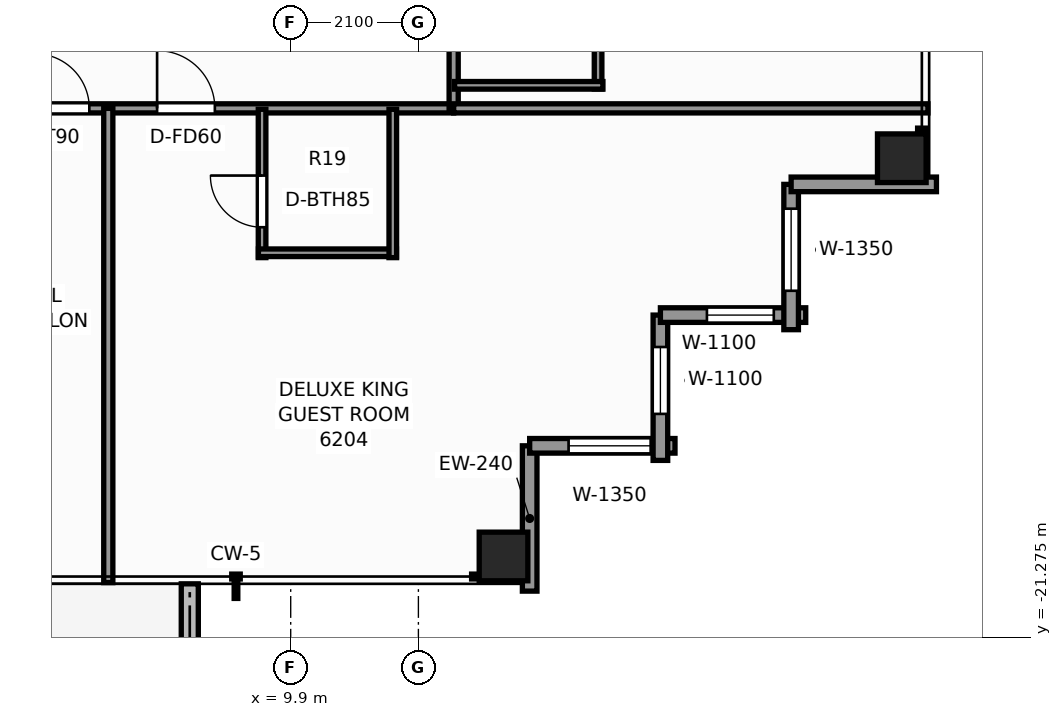
"""IFC4 building model, lengths in metres.
Left out: names, types, materials, properties, quantities, classifications, styles, units other than length and angle.
Written with IfcOpenShell. Run it as: python <this file> out.ifc"""

import sys

from ifc_helpers import new_model, si_unit, direction, frame, frame_2d, origin, origin_2d, place, context, subcontext, project, spatial, rectangle, extrude, element, fill, save


model = new_model("IFC4")
c1 = context("Model", 3, precision=1e-05, world=origin(), true_north=direction((0.0, 1.0)))
c2 = subcontext(c1, "Body", "Model", "MODEL_VIEW")
j1 = project(units=[si_unit("LENGTHUNIT", "METRE"), si_unit("PLANEANGLEUNIT", "RADIAN")], contexts=[c1])
p1 = place(None, origin())
s1 = spatial("IfcSite", under=j1, at=p1, CompositionType="ELEMENT")
p2 = place(p1, origin())
s2 = spatial("IfcBuilding", under=s1, at=p2, CompositionType="ELEMENT")
p3 = place(p2, frame((0.0, 0.0, 213.0)))
s3 = spatial("IfcBuildingStorey", under=s2, at=p3, CompositionType="ELEMENT", Elevation=213.0)
for number, where, z_axis, x_axis in (
    (1, (13.4, -19.95, 0.0), (0.0, 0.0, 1.0), (1.0, 0.0, 0.0)),
    (2, (19.95, -13.4, 0.0), (0.0, 0.0, 1.0), (1.0, 0.0, 0.0)),
):
    element("IfcColumn", number, at=place(p3, frame(where, z_axis=z_axis, x_axis=x_axis)), inside=s3, PredefinedType="COLUMN", context=c2, shape_type="SweptSolid", body=[
        extrude(rectangle(XDim=0.8, YDim=0.8, at=origin_2d()), origin(), (0.0, 0.0, 1.0), 3.3),
    ])
p4 = place(p3, frame((8.24, -23.074, -0.04), z_axis=(0.0, 0.0, 1.0), x_axis=(0.0, 1.0, 0.0)))
e3 = element("IfcWall", 3, at=p4, inside=s3, PredefinedType="PARAPET", context=c2, shape_type="SweptSolid", body=[
    extrude(rectangle(XDim=2.674, YDim=0.28, at=frame_2d((1.337, 0.0))), origin(), (0.0, 0.0, 1.0), 0.42),
])
p5 = place(p3, frame((13.83, -18.13, 0.0), z_axis=(0.0, 0.0, 1.0), x_axis=(0.0, -1.0, 0.0)))
e4 = element("IfcWall", 4, at=p5, inside=s3, PredefinedType="STANDARD", context=c2, shape_type="SweptSolid", body=[
    extrude(rectangle(XDim=2.39, YDim=0.24, at=frame_2d((1.195, 0.0))), origin(), (0.0, 0.0, 1.0), 2.463),
])
p6 = place(p3, frame((16.22, -18.13, 0.0), z_axis=(0.0, 0.0, 1.0), x_axis=(-1.0, 0.0, 0.0)))
e5 = element("IfcWall", 5, at=p6, inside=s3, PredefinedType="STANDARD", context=c2, shape_type="SweptSolid", body=[
    extrude(rectangle(XDim=2.39, YDim=0.24, at=frame_2d((1.195, 0.0))), origin(), (0.0, 0.0, 1.0), 2.463),
])
p7 = place(p6, frame((0.4, 0.0, 0.65)))
e6 = element("IfcOpeningElement", 6, at=p7, cuts=e5, PredefinedType="OPENING", context=c2, shape_type="SweptSolid", body=[
    extrude(rectangle(XDim=1.35, YDim=1.55, at=frame_2d((0.675, 0.775))), frame((0.0, 0.13, 0.0), z_axis=(0.0, -1.0, 0.0), x_axis=(1.0, 0.0, 0.0)), (0.0, 0.0, 1.0), 0.26),
])
p8 = place(p3, frame((15.98, -15.98, 0.0), z_axis=(0.0, 0.0, 1.0), x_axis=(0.0, -1.0, 0.0)))
e7 = element("IfcWall", 7, at=p8, inside=s3, PredefinedType="STANDARD", context=c2, shape_type="SweptSolid", body=[
    extrude(rectangle(XDim=2.39, YDim=0.24, at=frame_2d((1.195, 0.0))), origin(), (0.0, 0.0, 1.0), 2.463),
])
p9 = place(p8, frame((0.525, 0.0, 0.65)))
e8 = element("IfcOpeningElement", 8, at=p9, cuts=e7, PredefinedType="OPENING", context=c2, shape_type="SweptSolid", body=[
    extrude(rectangle(XDim=1.1, YDim=1.45, at=frame_2d((0.55, 0.725))), frame((0.0, 0.13, 0.0), z_axis=(0.0, -1.0, 0.0), x_axis=(1.0, 0.0, 0.0)), (0.0, 0.0, 1.0), 0.26),
])
p10 = place(p3, frame((18.37, -15.98, 0.0), z_axis=(0.0, 0.0, 1.0), x_axis=(-1.0, 0.0, 0.0)))
e9 = element("IfcWall", 9, at=p10, inside=s3, PredefinedType="STANDARD", context=c2, shape_type="SweptSolid", body=[
    extrude(rectangle(XDim=2.39, YDim=0.24, at=frame_2d((1.195, 0.0))), origin(), (0.0, 0.0, 1.0), 2.463),
])
p11 = place(p10, frame((0.525, 0.0, 0.65)))
e10 = element("IfcOpeningElement", 10, at=p11, cuts=e9, PredefinedType="OPENING", context=c2, shape_type="SweptSolid", body=[
    extrude(rectangle(XDim=1.1, YDim=1.45, at=frame_2d((0.55, 0.725))), frame((0.0, 0.13, 0.0), z_axis=(0.0, -1.0, 0.0), x_axis=(1.0, 0.0, 0.0)), (0.0, 0.0, 1.0), 0.26),
])
p12 = place(p3, frame((18.13, -13.83, 0.0), z_axis=(0.0, 0.0, 1.0), x_axis=(0.0, -1.0, 0.0)))
e11 = element("IfcWall", 11, at=p12, inside=s3, PredefinedType="STANDARD", context=c2, shape_type="SweptSolid", body=[
    extrude(rectangle(XDim=2.39, YDim=0.24, at=frame_2d((1.195, 0.0))), origin(), (0.0, 0.0, 1.0), 2.463),
])
p13 = place(p12, frame((0.4, 0.0, 0.65)))
e12 = element("IfcOpeningElement", 12, at=p13, cuts=e11, PredefinedType="OPENING", context=c2, shape_type="SweptSolid", body=[
    extrude(rectangle(XDim=1.35, YDim=1.55, at=frame_2d((0.675, 0.775))), frame((0.0, 0.13, 0.0), z_axis=(0.0, -1.0, 0.0), x_axis=(1.0, 0.0, 0.0)), (0.0, 0.0, 1.0), 0.26),
])
p14 = place(p3, frame((20.52, -13.83, 0.0), z_axis=(0.0, 0.0, 1.0), x_axis=(-1.0, 0.0, 0.0)))
e13 = element("IfcWall", 13, at=p14, inside=s3, PredefinedType="STANDARD", context=c2, shape_type="SweptSolid", body=[
    extrude(rectangle(XDim=2.39, YDim=0.24, at=frame_2d((1.195, 0.0))), origin(), (0.0, 0.0, 1.0), 2.463),
])
p15 = place(p3, frame((-12.58, -12.58, 0.0), z_axis=(0.0, 0.0, 1.0), x_axis=(1.0, 0.0, 0.0)))
e14 = element("IfcWall", 14, at=p15, inside=s3, PredefinedType="PARTITIONING", context=c2, shape_type="SweptSolid", body=[
    extrude(rectangle(XDim=25.16, YDim=0.15, at=frame_2d((12.58, 0.0))), origin(), (0.0, 0.0, 1.0), 2.369),
])
p16 = place(p15, frame((3.919, 0.0, 0.0)))
e15 = element("IfcOpeningElement", 15, at=p16, cuts=e14, PredefinedType="OPENING", context=c2, shape_type="SweptSolid", body=[
    extrude(rectangle(XDim=0.9, YDim=2.06, at=frame_2d((0.45, 1.03))), frame((0.0, 0.085, 0.0), z_axis=(0.0, -1.0, 0.0), x_axis=(1.0, 0.0, 0.0)), (0.0, 0.0, 1.0), 0.17),
])
p17 = place(p15, frame((8.951, 0.0, 0.0)))
e16 = element("IfcOpeningElement", 16, at=p17, cuts=e14, PredefinedType="OPENING", context=c2, shape_type="SweptSolid", body=[
    extrude(rectangle(XDim=0.9, YDim=2.06, at=frame_2d((0.45, 1.03))), frame((0.0, 0.085, 0.0), z_axis=(0.0, -1.0, 0.0), x_axis=(1.0, 0.0, 0.0)), (0.0, 0.0, 1.0), 0.17),
])
p18 = place(p15, frame((10.78, 0.0, 0.0)))
e17 = element("IfcOpeningElement", 17, at=p18, cuts=e14, PredefinedType="OPENING", context=c2, shape_type="SweptSolid", body=[
    extrude(rectangle(XDim=0.9, YDim=2.06, at=frame_2d((0.45, 1.03))), frame((0.0, 0.085, 0.0), z_axis=(0.0, -1.0, 0.0), x_axis=(1.0, 0.0, 0.0)), (0.0, 0.0, 1.0), 0.17),
])
p19 = place(p15, frame((13.749, 0.0, 0.0)))
e18 = element("IfcOpeningElement", 18, at=p19, cuts=e14, PredefinedType="OPENING", context=c2, shape_type="SweptSolid", body=[
    extrude(rectangle(XDim=0.95, YDim=2.06, at=frame_2d((0.475, 1.03))), frame((0.0, 0.085, 0.0), z_axis=(0.0, -1.0, 0.0), x_axis=(1.0, 0.0, 0.0)), (0.0, 0.0, 1.0), 0.17),
])
p20 = place(p15, frame((18.268, 0.0, 0.0)))
e19 = element("IfcOpeningElement", 19, at=p20, cuts=e14, PredefinedType="OPENING", context=c2, shape_type="SweptSolid", body=[
    extrude(rectangle(XDim=0.9, YDim=2.06, at=frame_2d((0.45, 1.03))), frame((0.0, 0.085, 0.0), z_axis=(0.0, -1.0, 0.0), x_axis=(1.0, 0.0, 0.0)), (0.0, 0.0, 1.0), 0.17),
])
p21 = place(p15, frame((20.283, 0.0, 0.0)))
e20 = element("IfcOpeningElement", 20, at=p21, cuts=e14, PredefinedType="OPENING", context=c2, shape_type="SweptSolid", body=[
    extrude(rectangle(XDim=0.95, YDim=2.06, at=frame_2d((0.475, 1.03))), frame((0.0, 0.085, 0.0), z_axis=(0.0, -1.0, 0.0), x_axis=(1.0, 0.0, 0.0)), (0.0, 0.0, 1.0), 0.17),
])
p22 = place(p3, frame((12.58, -12.58, 0.0), z_axis=(0.0, 0.0, 1.0), x_axis=(0.0, 1.0, 0.0)))
e21 = element("IfcWall", 21, at=p22, inside=s3, PredefinedType="PARTITIONING", context=c2, shape_type="SweptSolid", body=[
    extrude(rectangle(XDim=24.84, YDim=0.15, at=frame_2d((12.42, 0.0))), origin(), (0.0, 0.0, 1.0), 2.369),
])
p23 = place(p22, frame((3.338, 0.0, 0.0)))
e22 = element("IfcOpeningElement", 22, at=p23, cuts=e21, PredefinedType="OPENING", context=c2, shape_type="SweptSolid", body=[
    extrude(rectangle(XDim=0.95, YDim=2.06, at=frame_2d((0.475, 1.03))), frame((0.0, 0.085, 0.0), z_axis=(0.0, -1.0, 0.0), x_axis=(1.0, 0.0, 0.0)), (0.0, 0.0, 1.0), 0.17),
])
p24 = place(p22, frame((9.119, 0.0, 0.0)))
e23 = element("IfcOpeningElement", 23, at=p24, cuts=e21, PredefinedType="OPENING", context=c2, shape_type="SweptSolid", body=[
    extrude(rectangle(XDim=0.95, YDim=2.06, at=frame_2d((0.475, 1.03))), frame((0.0, 0.085, 0.0), z_axis=(0.0, -1.0, 0.0), x_axis=(1.0, 0.0, 0.0)), (0.0, 0.0, 1.0), 0.17),
])
p25 = place(p22, frame((14.452, 0.0, 0.0)))
e24 = element("IfcOpeningElement", 24, at=p25, cuts=e21, PredefinedType="OPENING", context=c2, shape_type="SweptSolid", body=[
    extrude(rectangle(XDim=0.95, YDim=2.06, at=frame_2d((0.475, 1.03))), frame((0.0, 0.085, 0.0), z_axis=(0.0, -1.0, 0.0), x_axis=(1.0, 0.0, 0.0)), (0.0, 0.0, 1.0), 0.17),
])
p26 = place(p22, frame((20.887, 0.0, 0.0)))
e25 = element("IfcOpeningElement", 25, at=p26, cuts=e21, PredefinedType="OPENING", context=c2, shape_type="SweptSolid", body=[
    extrude(rectangle(XDim=0.95, YDim=2.06, at=frame_2d((0.475, 1.03))), frame((0.0, 0.085, 0.0), z_axis=(0.0, -1.0, 0.0), x_axis=(1.0, 0.0, 0.0)), (0.0, 0.0, 1.0), 0.17),
])
p27 = place(p3, frame((12.58, -12.58, 0.0), z_axis=(0.0, 0.0, 1.0), x_axis=(1.0, 0.0, 0.0)))
e26 = element("IfcWall", 26, at=p27, inside=s3, PredefinedType="PARTITIONING", context=c2, shape_type="SweptSolid", body=[
    extrude(rectangle(XDim=7.8, YDim=0.15, at=frame_2d((3.9, 0.0))), origin(), (0.0, 0.0, 1.0), 2.369),
])
p28 = place(p3, frame((6.9, -20.38, 0.0), z_axis=(0.0, 0.0, 1.0), x_axis=(0.0, 1.0, 0.0)))
e27 = element("IfcWall", 27, at=p28, inside=s3, PredefinedType="PARTITIONING", context=c2, shape_type="SweptSolid", body=[
    extrude(rectangle(XDim=7.8, YDim=0.15, at=frame_2d((3.9, 0.0))), origin(), (0.0, 0.0, 1.0), 2.453),
])
p29 = place(p3, frame((9.429, -15.035, 0.0), z_axis=(0.0, 0.0, 1.0), x_axis=(0.0, 1.0, 0.0)))
e28 = element("IfcWall", 28, at=p29, inside=s3, PredefinedType="PARTITIONING", context=c2, shape_type="SweptSolid", body=[
    extrude(rectangle(XDim=2.44, YDim=0.125, at=frame_2d((1.22, 0.0))), origin(), (0.0, 0.0, 1.0), 3.08),
])
p30 = place(p29, frame((0.5, 0.0, 0.0)))
e29 = element("IfcOpeningElement", 29, at=p30, cuts=e28, PredefinedType="OPENING", context=c2, shape_type="SweptSolid", body=[
    extrude(rectangle(XDim=0.85, YDim=2.03, at=frame_2d((0.425, 1.015))), frame((0.0, 0.073, 0.0), z_axis=(0.0, -1.0, 0.0), x_axis=(1.0, 0.0, 0.0)), (0.0, 0.0, 1.0), 0.145),
])
p31 = place(p3, frame((9.369, -14.955, 0.0), z_axis=(0.0, 0.0, 1.0), x_axis=(1.0, 0.0, 0.0)))
e30 = element("IfcWall", 30, at=p31, inside=s3, PredefinedType="PARTITIONING", context=c2, shape_type="SweptSolid", body=[
    extrude(rectangle(XDim=2.27, YDim=0.125, at=frame_2d((1.135, 0.0))), origin(), (0.0, 0.0, 1.0), 2.369),
])
p32 = place(p3, frame((11.579, -15.035, 0.0), z_axis=(0.0, 0.0, 1.0), x_axis=(0.0, 1.0, 0.0)))
e31 = element("IfcWall", 31, at=p32, inside=s3, PredefinedType="PARTITIONING", context=c2, shape_type="SweptSolid", body=[
    extrude(rectangle(XDim=2.44, YDim=0.125, at=frame_2d((1.22, 0.0))), origin(), (0.0, 0.0, 1.0), 2.369),
])
p33 = place(p3, frame((14.955, -12.261, 0.0), z_axis=(0.0, 0.0, 1.0), x_axis=(0.0, 1.0, 0.0)))
e32 = element("IfcWall", 32, at=p33, inside=s3, PredefinedType="PARTITIONING", context=c2, shape_type="SweptSolid", body=[
    extrude(rectangle(XDim=2.27, YDim=0.125, at=frame_2d((1.135, 0.0))), origin(), (0.0, 0.0, 1.0), 2.369),
])
p34 = place(p3, frame((12.595, -12.201, 0.0), z_axis=(0.0, 0.0, 1.0), x_axis=(1.0, 0.0, 0.0)))
e33 = element("IfcWall", 33, at=p34, inside=s3, PredefinedType="PARTITIONING", context=c2, shape_type="SweptSolid", body=[
    extrude(rectangle(XDim=2.44, YDim=0.125, at=frame_2d((1.22, 0.0))), origin(), (0.0, 0.0, 1.0), 3.08),
])
p35 = place(p7, origin())
e34 = element("IfcWindow", 34, at=p35, inside=s3, PartitioningType="SINGLE_PANEL", PredefinedType="WINDOW", context=c2, shape_type="SweptSolid", body=[
    extrude(rectangle(XDim=1.35, YDim=1.55, at=frame_2d((0.675, 0.775))), frame((0.0, 0.03, 0.0), z_axis=(0.0, -1.0, 0.0), x_axis=(1.0, 0.0, 0.0)), (0.0, 0.0, 1.0), 0.06),
])
fill(e6, e34)
p36 = place(p9, origin())
e35 = element("IfcWindow", 35, at=p36, inside=s3, PartitioningType="SINGLE_PANEL", PredefinedType="WINDOW", context=c2, shape_type="SweptSolid", body=[
    extrude(rectangle(XDim=1.1, YDim=1.45, at=frame_2d((0.55, 0.725))), frame((0.0, 0.03, 0.0), z_axis=(0.0, -1.0, 0.0), x_axis=(1.0, 0.0, 0.0)), (0.0, 0.0, 1.0), 0.06),
])
fill(e8, e35)
p37 = place(p11, origin())
e36 = element("IfcWindow", 36, at=p37, inside=s3, PartitioningType="SINGLE_PANEL", PredefinedType="WINDOW", context=c2, shape_type="SweptSolid", body=[
    extrude(rectangle(XDim=1.1, YDim=1.45, at=frame_2d((0.55, 0.725))), frame((0.0, 0.03, 0.0), z_axis=(0.0, -1.0, 0.0), x_axis=(1.0, 0.0, 0.0)), (0.0, 0.0, 1.0), 0.06),
])
fill(e10, e36)
p38 = place(p13, origin())
e37 = element("IfcWindow", 37, at=p38, inside=s3, PartitioningType="SINGLE_PANEL", PredefinedType="WINDOW", context=c2, shape_type="SweptSolid", body=[
    extrude(rectangle(XDim=1.35, YDim=1.55, at=frame_2d((0.675, 0.775))), frame((0.0, 0.03, 0.0), z_axis=(0.0, -1.0, 0.0), x_axis=(1.0, 0.0, 0.0)), (0.0, 0.0, 1.0), 0.06),
])
fill(e12, e37)
p39 = place(p20, origin())
e38 = element("IfcDoor", 38, at=p39, inside=s3, OperationType="SINGLE_SWING_LEFT", PredefinedType="DOOR", context=c2, shape_type="SweptSolid", body=[
    extrude(rectangle(XDim=0.9, YDim=2.06, at=frame_2d((0.45, 1.03))), frame((0.0, 0.025, 0.0), z_axis=(0.0, -1.0, 0.0), x_axis=(1.0, 0.0, 0.0)), (0.0, 0.0, 1.0), 0.05),
])
fill(e19, e38)
p40 = place(p30, origin())
e39 = element("IfcDoor", 39, at=p40, inside=s3, OperationType="SINGLE_SWING_RIGHT", PredefinedType="DOOR", context=c2, shape_type="SweptSolid", body=[
    extrude(rectangle(XDim=0.85, YDim=2.03, at=frame_2d((0.425, 1.015))), frame((0.0, 0.025, 0.0), z_axis=(0.0, -1.0, 0.0), x_axis=(1.0, 0.0, 0.0)), (0.0, 0.0, 1.0), 0.05),
])
fill(e29, e39)
p41 = place(p21, origin())
e40 = element("IfcDoor", 40, at=p41, inside=s3, OperationType="SINGLE_SWING_LEFT", PredefinedType="DOOR", context=c2, shape_type="SweptSolid", body=[
    extrude(rectangle(XDim=0.95, YDim=2.06, at=frame_2d((0.475, 1.03))), frame((0.0, 0.025, 0.0), z_axis=(0.0, -1.0, 0.0), x_axis=(1.0, 0.0, 0.0)), (0.0, 0.0, 1.0), 0.05),
])
fill(e20, e40)
save(model, sys.argv[1])
